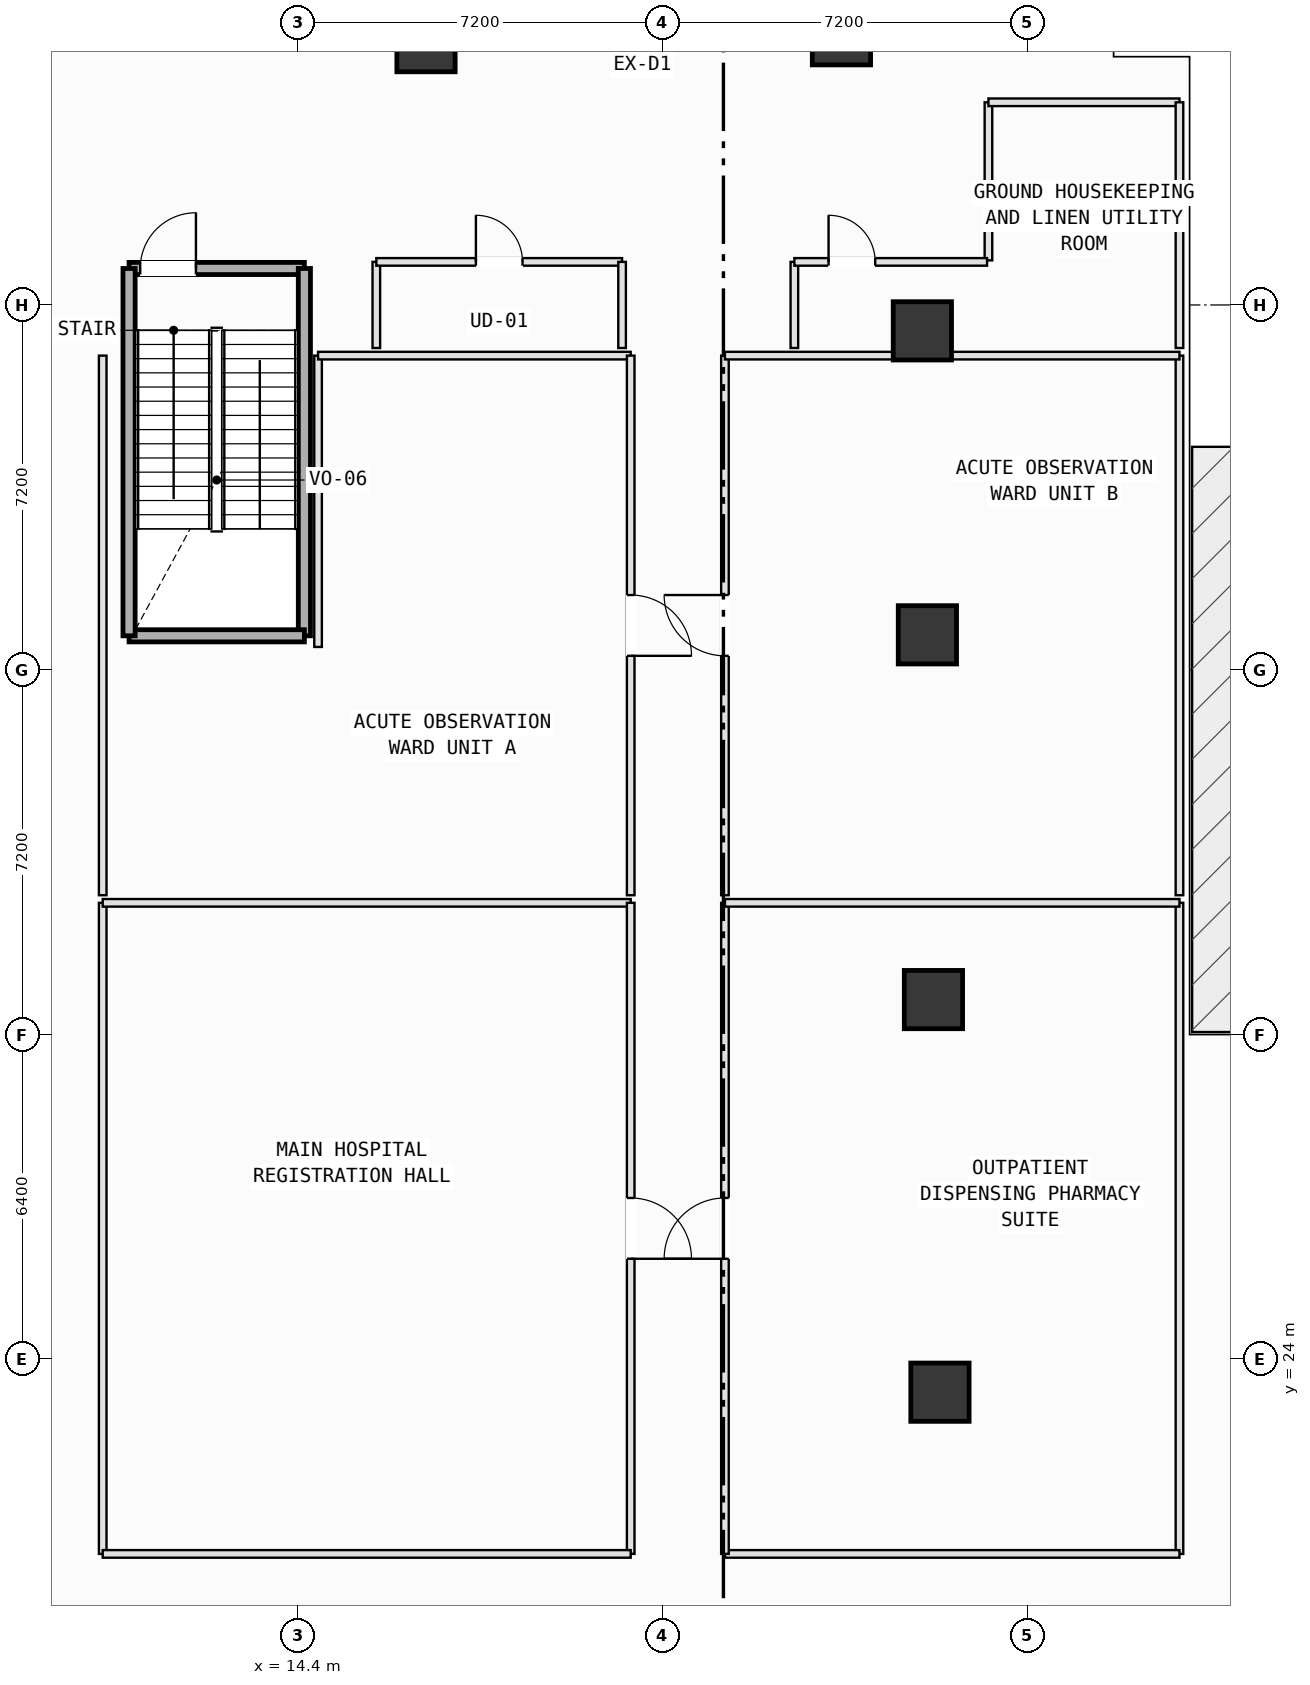
"""IFC4 building model, lengths in metres.
Left out: names, types, materials, properties, quantities, classifications, styles, units other than length and angle.
Written with IfcOpenShell. Run it as: python <this file> out.ifc"""

import sys

from ifc_helpers import new_model, si_unit, direction, frame, frame_2d, origin, origin_2d, place, context, subcontext, project, spatial, rectangle, extrude, element, fill, save


model = new_model("IFC4")
c1 = context("Model", 3, precision=1e-05, world=origin(), true_north=direction((0.0, 1.0)))
c2 = subcontext(c1, "Body", "Model", "MODEL_VIEW")
j1 = project(units=[si_unit("LENGTHUNIT", "METRE"), si_unit("PLANEANGLEUNIT", "RADIAN")], contexts=[c1])
p1 = place(None, origin())
s1 = spatial("IfcSite", under=j1, at=p1, CompositionType="ELEMENT")
p2 = place(p1, origin())
s2 = spatial("IfcBuilding", under=s1, at=p2, CompositionType="ELEMENT")
p3 = place(p2, origin())
s3 = spatial("IfcBuildingStorey", under=s2, at=p3, CompositionType="ELEMENT", Elevation=0.0)
for number, where, z_axis, x_axis in (
    (1, (27.073, 23.342, 0.0), (0.0, 0.0, 1.0), (1.0, 0.0, 0.0)),
    (2, (26.945, 31.091, 0.0), (0.0, 0.0, 1.0), (1.0, 0.0, 0.0)),
    (3, (26.825, 38.29, 0.0), (0.0, 0.0, 1.0), (1.0, 0.0, 0.0)),
    (4, (26.726, 44.289, 0.0), (0.0, 0.0, 1.0), (1.0, 0.0, 0.0)),
    (5, (25.129, 50.113, 0.0), (0.0, 0.0, 1.0), (1.0, 0.0, 0.0)),
    (6, (16.93, 49.977, 0.0), (0.0, 0.0, 1.0), (1.0, 0.0, 0.0)),
):
    element("IfcColumn", number, at=place(p3, frame(where, z_axis=z_axis, x_axis=x_axis)), inside=s3, PredefinedType="COLUMN", context=c2, shape_type="SweptSolid", body=[
        extrude(rectangle(XDim=1.15, YDim=1.15, at=origin_2d()), origin(), (0.0, 0.0, 1.0), 5.4),
    ])
p4 = place(p3, frame((11.07, 45.52, 0.0), z_axis=(0.0, 0.0, 1.0), x_axis=(1.0, 0.0, 0.0)))
e7 = element("IfcWall", 7, at=p4, inside=s3, PredefinedType="SOLIDWALL", context=c2, shape_type="SweptSolid", body=[
    extrude(rectangle(XDim=3.46, YDim=0.24, at=frame_2d((1.73, 0.0))), origin(), (0.0, 0.0, 1.0), 5.15),
])
p5 = place(p4, frame((0.22, 0.0, 0.0)))
e8 = element("IfcOpeningElement", 8, at=p5, cuts=e7, PredefinedType="OPENING", context=c2, shape_type="SweptSolid", body=[
    extrude(rectangle(XDim=1.1, YDim=2.15, at=frame_2d((0.55, 1.075))), frame((0.0, 0.13, 0.0), z_axis=(0.0, -1.0, 0.0), x_axis=(1.0, 0.0, 0.0)), (0.0, 0.0, 1.0), 0.26),
])
p6 = place(p3, frame((14.53, 45.52, 0.0), z_axis=(0.0, 0.0, 1.0), x_axis=(0.0, -1.0, 0.0)))
e9 = element("IfcWall", 9, at=p6, inside=s3, PredefinedType="SOLIDWALL", context=c2, shape_type="SweptSolid", body=[
    extrude(rectangle(XDim=7.25, YDim=0.24, at=frame_2d((3.625, 0.0))), origin(), (0.0, 0.0, 1.0), 5.15),
])
p7 = place(p3, frame((14.53, 38.27, 0.0), z_axis=(0.0, 0.0, 1.0), x_axis=(-1.0, 0.0, 0.0)))
e10 = element("IfcWall", 10, at=p7, inside=s3, PredefinedType="SOLIDWALL", context=c2, shape_type="SweptSolid", body=[
    extrude(rectangle(XDim=3.46, YDim=0.24, at=frame_2d((1.73, 0.0))), origin(), (0.0, 0.0, 1.0), 5.15),
])
p8 = place(p3, frame((11.07, 38.27, 0.0), z_axis=(0.0, 0.0, 1.0), x_axis=(0.0, 1.0, 0.0)))
e11 = element("IfcWall", 11, at=p8, inside=s3, PredefinedType="SOLIDWALL", context=c2, shape_type="SweptSolid", body=[
    extrude(rectangle(XDim=7.25, YDim=0.24, at=frame_2d((3.625, 0.0))), origin(), (0.0, 0.0, 1.0), 5.15),
])
p9 = place(p3, frame((10.55, 20.15, 0.0), z_axis=(0.0, 0.0, 1.0), x_axis=(0.0, 1.0, 0.0)))
e12 = element("IfcWall", 12, at=p9, inside=s3, PredefinedType="PARTITIONING", context=c2, shape_type="SweptSolid", body=[
    extrude(rectangle(XDim=12.85, YDim=0.15, at=frame_2d((6.425, 0.0))), origin(), (0.0, 0.0, 1.0), 5.15),
])
p10 = place(p3, frame((10.55, 33.0, 0.0), z_axis=(0.0, 0.0, 1.0), x_axis=(1.0, 0.0, 0.0)))
e13 = element("IfcWall", 13, at=p10, inside=s3, PredefinedType="PARTITIONING", context=c2, shape_type="SweptSolid", body=[
    extrude(rectangle(XDim=10.42, YDim=0.15, at=frame_2d((5.21, 0.0))), origin(), (0.0, 0.0, 1.0), 5.15),
])
p11 = place(p3, frame((20.97, 33.0, 0.0), z_axis=(0.0, 0.0, 1.0), x_axis=(0.0, -1.0, 0.0)))
e14 = element("IfcWall", 14, at=p11, inside=s3, PredefinedType="PARTITIONING", context=c2, shape_type="SweptSolid", body=[
    extrude(rectangle(XDim=12.85, YDim=0.15, at=frame_2d((6.425, 0.0))), origin(), (0.0, 0.0, 1.0), 5.15),
])
p12 = place(p11, frame((5.825, 0.0, 0.0)))
e15 = element("IfcOpeningElement", 15, at=p12, cuts=e14, PredefinedType="OPENING", context=c2, shape_type="SweptSolid", body=[
    extrude(rectangle(XDim=1.2, YDim=2.15, at=frame_2d((0.6, 1.075))), frame((0.0, 0.085, 0.0), z_axis=(0.0, -1.0, 0.0), x_axis=(1.0, 0.0, 0.0)), (0.0, 0.0, 1.0), 0.17),
])
p13 = place(p3, frame((20.97, 20.15, 0.0), z_axis=(0.0, 0.0, 1.0), x_axis=(-1.0, 0.0, 0.0)))
e16 = element("IfcWall", 16, at=p13, inside=s3, PredefinedType="PARTITIONING", context=c2, shape_type="SweptSolid", body=[
    extrude(rectangle(XDim=10.42, YDim=0.15, at=frame_2d((5.21, 0.0))), origin(), (0.0, 0.0, 1.0), 5.15),
])
p14 = place(p3, frame((31.8, 33.0, 0.0), z_axis=(0.0, 0.0, 1.0), x_axis=(0.0, -1.0, 0.0)))
e17 = element("IfcWall", 17, at=p14, inside=s3, PredefinedType="PARTITIONING", context=c2, shape_type="SweptSolid", body=[
    extrude(rectangle(XDim=12.85, YDim=0.15, at=frame_2d((6.425, 0.0))), origin(), (0.0, 0.0, 1.0), 5.15),
])
p15 = place(p3, frame((31.8, 20.15, 0.0), z_axis=(0.0, 0.0, 1.0), x_axis=(-1.0, 0.0, 0.0)))
e18 = element("IfcWall", 18, at=p15, inside=s3, PredefinedType="PARTITIONING", context=c2, shape_type="SweptSolid", body=[
    extrude(rectangle(XDim=8.97, YDim=0.15, at=frame_2d((4.485, 0.0))), origin(), (0.0, 0.0, 1.0), 5.15),
])
p16 = place(p3, frame((22.83, 20.15, 0.0), z_axis=(0.0, 0.0, 1.0), x_axis=(0.0, 1.0, 0.0)))
e19 = element("IfcWall", 19, at=p16, inside=s3, PredefinedType="PARTITIONING", context=c2, shape_type="SweptSolid", body=[
    extrude(rectangle(XDim=12.85, YDim=0.15, at=frame_2d((6.425, 0.0))), origin(), (0.0, 0.0, 1.0), 5.15),
])
p17 = place(p16, frame((5.825, 0.0, 0.0)))
e20 = element("IfcOpeningElement", 20, at=p17, cuts=e19, PredefinedType="OPENING", context=c2, shape_type="SweptSolid", body=[
    extrude(rectangle(XDim=1.2, YDim=2.15, at=frame_2d((0.6, 1.075))), frame((0.0, 0.085, 0.0), z_axis=(0.0, -1.0, 0.0), x_axis=(1.0, 0.0, 0.0)), (0.0, 0.0, 1.0), 0.17),
])
p18 = place(p3, frame((22.83, 33.0, 0.0), z_axis=(0.0, 0.0, 1.0), x_axis=(1.0, 0.0, 0.0)))
e21 = element("IfcWall", 21, at=p18, inside=s3, PredefinedType="PARTITIONING", context=c2, shape_type="SweptSolid", body=[
    extrude(rectangle(XDim=8.97, YDim=0.15, at=frame_2d((4.485, 0.0))), origin(), (0.0, 0.0, 1.0), 5.15),
])
p19 = place(p3, frame((10.55, 33.15, 0.0), z_axis=(0.0, 0.0, 1.0), x_axis=(0.0, 1.0, 0.0)))
e22 = element("IfcWall", 22, at=p19, inside=s3, PredefinedType="PARTITIONING", context=c2, shape_type="SweptSolid", body=[
    extrude(rectangle(XDim=10.65, YDim=0.15, at=frame_2d((5.325, 0.0))), origin(), (0.0, 0.0, 1.0), 5.15),
])
p20 = place(p3, frame((14.8, 38.05, 0.0), z_axis=(0.0, 0.0, 1.0), x_axis=(0.0, 1.0, 0.0)))
e23 = element("IfcWall", 23, at=p20, inside=s3, PredefinedType="PARTITIONING", context=c2, shape_type="SweptSolid", body=[
    extrude(rectangle(XDim=5.75, YDim=0.15, at=frame_2d((2.875, 0.0))), origin(), (0.0, 0.0, 1.0), 5.15),
])
p21 = place(p3, frame((14.8, 43.8, 0.0), z_axis=(0.0, 0.0, 1.0), x_axis=(1.0, 0.0, 0.0)))
e24 = element("IfcWall", 24, at=p21, inside=s3, PredefinedType="PARTITIONING", context=c2, shape_type="SweptSolid", body=[
    extrude(rectangle(XDim=6.17, YDim=0.15, at=frame_2d((3.085, 0.0))), origin(), (0.0, 0.0, 1.0), 5.15),
])
p22 = place(p3, frame((20.97, 43.8, 0.0), z_axis=(0.0, 0.0, 1.0), x_axis=(0.0, -1.0, 0.0)))
e25 = element("IfcWall", 25, at=p22, inside=s3, PredefinedType="PARTITIONING", context=c2, shape_type="SweptSolid", body=[
    extrude(rectangle(XDim=10.65, YDim=0.15, at=frame_2d((5.325, 0.0))), origin(), (0.0, 0.0, 1.0), 5.15),
])
p23 = place(p22, frame((4.725, 0.0, 0.0)))
e26 = element("IfcOpeningElement", 26, at=p23, cuts=e25, PredefinedType="OPENING", context=c2, shape_type="SweptSolid", body=[
    extrude(rectangle(XDim=1.2, YDim=2.15, at=frame_2d((0.6, 1.075))), frame((0.0, 0.085, 0.0), z_axis=(0.0, -1.0, 0.0), x_axis=(1.0, 0.0, 0.0)), (0.0, 0.0, 1.0), 0.17),
])
p24 = place(p3, frame((31.8, 43.8, 0.0), z_axis=(0.0, 0.0, 1.0), x_axis=(0.0, -1.0, 0.0)))
e27 = element("IfcWall", 27, at=p24, inside=s3, PredefinedType="PARTITIONING", context=c2, shape_type="SweptSolid", body=[
    extrude(rectangle(XDim=10.65, YDim=0.15, at=frame_2d((5.325, 0.0))), origin(), (0.0, 0.0, 1.0), 5.15),
])
p25 = place(p3, frame((22.83, 33.15, 0.0), z_axis=(0.0, 0.0, 1.0), x_axis=(0.0, 1.0, 0.0)))
e28 = element("IfcWall", 28, at=p25, inside=s3, PredefinedType="PARTITIONING", context=c2, shape_type="SweptSolid", body=[
    extrude(rectangle(XDim=10.65, YDim=0.15, at=frame_2d((5.325, 0.0))), origin(), (0.0, 0.0, 1.0), 5.15),
])
p26 = place(p25, frame((4.725, 0.0, 0.0)))
e29 = element("IfcOpeningElement", 29, at=p26, cuts=e28, PredefinedType="OPENING", context=c2, shape_type="SweptSolid", body=[
    extrude(rectangle(XDim=1.2, YDim=2.15, at=frame_2d((0.6, 1.075))), frame((0.0, 0.085, 0.0), z_axis=(0.0, -1.0, 0.0), x_axis=(1.0, 0.0, 0.0)), (0.0, 0.0, 1.0), 0.17),
])
p27 = place(p3, frame((22.83, 43.8, 0.0), z_axis=(0.0, 0.0, 1.0), x_axis=(1.0, 0.0, 0.0)))
e30 = element("IfcWall", 30, at=p27, inside=s3, PredefinedType="PARTITIONING", context=c2, shape_type="SweptSolid", body=[
    extrude(rectangle(XDim=8.97, YDim=0.15, at=frame_2d((4.485, 0.0))), origin(), (0.0, 0.0, 1.0), 5.15),
])
p28 = place(p3, frame((15.95, 43.95, 0.0), z_axis=(0.0, 0.0, 1.0), x_axis=(0.0, 1.0, 0.0)))
e31 = element("IfcWall", 31, at=p28, inside=s3, PredefinedType="PARTITIONING", context=c2, shape_type="SweptSolid", body=[
    extrude(rectangle(XDim=1.7, YDim=0.15, at=frame_2d((0.85, 0.0))), origin(), (0.0, 0.0, 1.0), 5.15),
])
p29 = place(p3, frame((15.95, 45.65, 0.0), z_axis=(0.0, 0.0, 1.0), x_axis=(1.0, 0.0, 0.0)))
e32 = element("IfcWall", 32, at=p29, inside=s3, PredefinedType="PARTITIONING", context=c2, shape_type="SweptSolid", body=[
    extrude(rectangle(XDim=4.85, YDim=0.15, at=frame_2d((2.425, 0.0))), origin(), (0.0, 0.0, 1.0), 5.15),
])
p30 = place(p29, frame((1.965, 0.0, 0.0)))
e33 = element("IfcOpeningElement", 33, at=p30, cuts=e32, PredefinedType="OPENING", context=c2, shape_type="SweptSolid", body=[
    extrude(rectangle(XDim=0.92, YDim=2.1, at=frame_2d((0.46, 1.05))), frame((0.0, 0.085, 0.0), z_axis=(0.0, -1.0, 0.0), x_axis=(1.0, 0.0, 0.0)), (0.0, 0.0, 1.0), 0.17),
])
p31 = place(p3, frame((20.8, 45.65, 0.0), z_axis=(0.0, 0.0, 1.0), x_axis=(0.0, -1.0, 0.0)))
e34 = element("IfcWall", 34, at=p31, inside=s3, PredefinedType="PARTITIONING", context=c2, shape_type="SweptSolid", body=[
    extrude(rectangle(XDim=1.7, YDim=0.15, at=frame_2d((0.85, 0.0))), origin(), (0.0, 0.0, 1.0), 5.15),
])
p32 = place(p3, frame((28.03, 45.68, 0.0), z_axis=(0.0, 0.0, 1.0), x_axis=(0.0, 1.0, 0.0)))
e35 = element("IfcWall", 35, at=p32, inside=s3, PredefinedType="PARTITIONING", context=c2, shape_type="SweptSolid", body=[
    extrude(rectangle(XDim=3.12, YDim=0.15, at=frame_2d((1.56, 0.0))), origin(), (0.0, 0.0, 1.0), 5.15),
])
p33 = place(p3, frame((28.03, 48.8, 0.0), z_axis=(0.0, 0.0, 1.0), x_axis=(1.0, 0.0, 0.0)))
e36 = element("IfcWall", 36, at=p33, inside=s3, PredefinedType="PARTITIONING", context=c2, shape_type="SweptSolid", body=[
    extrude(rectangle(XDim=3.77, YDim=0.15, at=frame_2d((1.885, 0.0))), origin(), (0.0, 0.0, 1.0), 5.15),
])
p34 = place(p3, frame((31.8, 48.8, 0.0), z_axis=(0.0, 0.0, 1.0), x_axis=(0.0, -1.0, 0.0)))
e37 = element("IfcWall", 37, at=p34, inside=s3, PredefinedType="PARTITIONING", context=c2, shape_type="SweptSolid", body=[
    extrude(rectangle(XDim=4.85, YDim=0.15, at=frame_2d((2.425, 0.0))), origin(), (0.0, 0.0, 1.0), 5.15),
])
p35 = place(p3, frame((24.2, 43.95, 0.0), z_axis=(0.0, 0.0, 1.0), x_axis=(0.0, 1.0, 0.0)))
e38 = element("IfcWall", 38, at=p35, inside=s3, PredefinedType="PARTITIONING", context=c2, shape_type="SweptSolid", body=[
    extrude(rectangle(XDim=1.7, YDim=0.15, at=frame_2d((0.85, 0.0))), origin(), (0.0, 0.0, 1.0), 5.15),
])
p36 = place(p3, frame((24.2, 45.65, 0.0), z_axis=(0.0, 0.0, 1.0), x_axis=(1.0, 0.0, 0.0)))
e39 = element("IfcWall", 39, at=p36, inside=s3, PredefinedType="PARTITIONING", context=c2, shape_type="SweptSolid", body=[
    extrude(rectangle(XDim=3.803, YDim=0.15, at=frame_2d((1.901, 0.0))), origin(), (0.0, 0.0, 1.0), 5.15),
])
p37 = place(p36, frame((0.675, 0.0, 0.0)))
e40 = element("IfcOpeningElement", 40, at=p37, cuts=e39, PredefinedType="OPENING", context=c2, shape_type="SweptSolid", body=[
    extrude(rectangle(XDim=0.92, YDim=2.1, at=frame_2d((0.46, 1.05))), frame((0.0, 0.085, 0.0), z_axis=(0.0, -1.0, 0.0), x_axis=(1.0, 0.0, 0.0)), (0.0, 0.0, 1.0), 0.17),
])
p38 = place(p5, origin())
e41 = element("IfcDoor", 41, at=p38, inside=s3, OperationType="SINGLE_SWING_RIGHT", PredefinedType="DOOR", context=c2, shape_type="SweptSolid", body=[
    extrude(rectangle(XDim=1.1, YDim=2.15, at=frame_2d((0.55, 1.075))), frame((0.0, 0.025, 0.0), z_axis=(0.0, -1.0, 0.0), x_axis=(1.0, 0.0, 0.0)), (0.0, 0.0, 1.0), 0.05),
])
fill(e8, e41)
p39 = place(p12, origin())
e42 = element("IfcDoor", 42, at=p39, inside=s3, OperationType="SINGLE_SWING_RIGHT", PredefinedType="DOOR", context=c2, shape_type="SweptSolid", body=[
    extrude(rectangle(XDim=1.2, YDim=2.15, at=frame_2d((0.6, 1.075))), frame((0.0, 0.025, 0.0), z_axis=(0.0, -1.0, 0.0), x_axis=(1.0, 0.0, 0.0)), (0.0, 0.0, 1.0), 0.05),
])
fill(e15, e42)
p40 = place(p17, origin())
e43 = element("IfcDoor", 43, at=p40, inside=s3, OperationType="SINGLE_SWING_LEFT", PredefinedType="DOOR", context=c2, shape_type="SweptSolid", body=[
    extrude(rectangle(XDim=1.2, YDim=2.15, at=frame_2d((0.6, 1.075))), frame((0.0, 0.025, 0.0), z_axis=(0.0, -1.0, 0.0), x_axis=(1.0, 0.0, 0.0)), (0.0, 0.0, 1.0), 0.05),
])
fill(e20, e43)
p41 = place(p23, origin())
e44 = element("IfcDoor", 44, at=p41, inside=s3, OperationType="SINGLE_SWING_RIGHT", PredefinedType="DOOR", context=c2, shape_type="SweptSolid", body=[
    extrude(rectangle(XDim=1.2, YDim=2.15, at=frame_2d((0.6, 1.075))), frame((0.0, 0.025, 0.0), z_axis=(0.0, -1.0, 0.0), x_axis=(1.0, 0.0, 0.0)), (0.0, 0.0, 1.0), 0.05),
])
fill(e26, e44)
p42 = place(p26, origin())
e45 = element("IfcDoor", 45, at=p42, inside=s3, OperationType="SINGLE_SWING_RIGHT", PredefinedType="DOOR", context=c2, shape_type="SweptSolid", body=[
    extrude(rectangle(XDim=1.2, YDim=2.15, at=frame_2d((0.6, 1.075))), frame((0.0, 0.025, 0.0), z_axis=(0.0, -1.0, 0.0), x_axis=(1.0, 0.0, 0.0)), (0.0, 0.0, 1.0), 0.05),
])
fill(e29, e45)
p43 = place(p30, origin())
e46 = element("IfcDoor", 46, at=p43, inside=s3, OperationType="SINGLE_SWING_LEFT", PredefinedType="DOOR", context=c2, shape_type="SweptSolid", body=[
    extrude(rectangle(XDim=0.92, YDim=2.1, at=frame_2d((0.46, 1.05))), frame((0.0, 0.025, 0.0), z_axis=(0.0, -1.0, 0.0), x_axis=(1.0, 0.0, 0.0)), (0.0, 0.0, 1.0), 0.05),
])
fill(e33, e46)
p44 = place(p37, origin())
e47 = element("IfcDoor", 47, at=p44, inside=s3, OperationType="SINGLE_SWING_LEFT", PredefinedType="DOOR", context=c2, shape_type="SweptSolid", body=[
    extrude(rectangle(XDim=0.92, YDim=2.1, at=frame_2d((0.46, 1.05))), frame((0.0, 0.025, 0.0), z_axis=(0.0, -1.0, 0.0), x_axis=(1.0, 0.0, 0.0)), (0.0, 0.0, 1.0), 0.05),
])
fill(e40, e47)
save(model, sys.argv[1])
